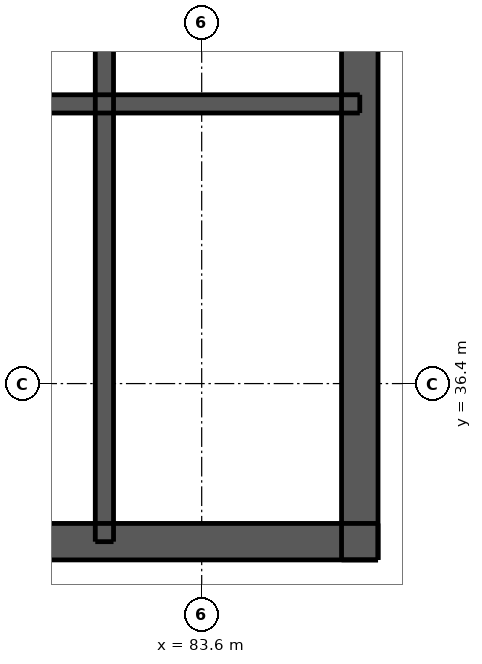
"""IFC4 building model, lengths in metres.
Left out: names, types, materials, properties, quantities, classifications, styles, units other than length and angle.
Written with IfcOpenShell. Run it as: python <this file> out.ifc"""

import sys

from ifc_helpers import new_model, si_unit, direction, frame, frame_2d, origin, place, context, subcontext, project, spatial, rectangle, extrude, element, fill, save


model = new_model("IFC4")
c1 = context("Model", 3, precision=1e-05, world=origin(), true_north=direction((0.0, 1.0)))
c2 = subcontext(c1, "Body", "Model", "MODEL_VIEW")
j1 = project(units=[si_unit("LENGTHUNIT", "METRE"), si_unit("PLANEANGLEUNIT", "RADIAN")], contexts=[c1])
p1 = place(None, origin())
s1 = spatial("IfcSite", under=j1, at=p1, CompositionType="ELEMENT")
p2 = place(p1, origin())
s2 = spatial("IfcBuilding", under=s1, at=p2, CompositionType="ELEMENT")
p3 = place(p2, frame((0.0, 0.0, 187.0)))
s3 = spatial("IfcBuildingStorey", under=s2, at=p3, CompositionType="ELEMENT", Elevation=187.0)
p4 = place(p3, frame((62.5, 33.8, 0.0), z_axis=(0.0, 0.0, 1.0), x_axis=(1.0, 0.0, 0.0)))
e1 = element("IfcWall", 1, at=p4, inside=s3, PredefinedType="SHEAR", context=c2, shape_type="SweptSolid", body=[
    extrude(rectangle(XDim=24.0, YDim=0.6, at=frame_2d((12.0, 0.0))), origin(), (0.0, 0.0, 1.0), 3.05),
])
p5 = place(p4, frame((1.925, 0.0, 0.0)))
e2 = element("IfcOpeningElement", 2, at=p5, cuts=e1, PredefinedType="OPENING", context=c2, shape_type="SweptSolid", body=[
    extrude(rectangle(XDim=1.1, YDim=2.1, at=frame_2d((0.55, 1.05))), frame((0.0, 0.31, 0.0), z_axis=(0.0, -1.0, 0.0), x_axis=(1.0, 0.0, 0.0)), (0.0, 0.0, 1.0), 0.62),
])
p6 = place(p4, frame((20.975, 0.0, 0.0)))
e3 = element("IfcOpeningElement", 3, at=p6, cuts=e1, PredefinedType="OPENING", context=c2, shape_type="SweptSolid", body=[
    extrude(rectangle(XDim=1.1, YDim=2.1, at=frame_2d((0.55, 1.05))), frame((0.0, 0.31, 0.0), z_axis=(0.0, -1.0, 0.0), x_axis=(1.0, 0.0, 0.0)), (0.0, 0.0, 1.0), 0.62),
])
p7 = place(p4, frame((8.0, 0.0, 0.0)))
e4 = element("IfcOpeningElement", 4, at=p7, cuts=e1, PredefinedType="OPENING", context=c2, shape_type="SweptSolid", body=[
    extrude(rectangle(XDim=1.1, YDim=2.1, at=frame_2d((0.55, 1.05))), frame((0.0, 0.31, 0.0), z_axis=(0.0, -1.0, 0.0), x_axis=(1.0, 0.0, 0.0)), (0.0, 0.0, 1.0), 0.62),
])
p8 = place(p4, frame((13.5, 0.0, 0.0)))
e5 = element("IfcOpeningElement", 5, at=p8, cuts=e1, PredefinedType="OPENING", context=c2, shape_type="SweptSolid", body=[
    extrude(rectangle(XDim=0.9, YDim=2.1, at=frame_2d((0.45, 1.05))), frame((0.0, 0.31, 0.0), z_axis=(0.0, -1.0, 0.0), x_axis=(1.0, 0.0, 0.0)), (0.0, 0.0, 1.0), 0.62),
])
p9 = place(p4, frame((17.1, 0.0, 0.0)))
e6 = element("IfcOpeningElement", 6, at=p9, cuts=e1, PredefinedType="OPENING", context=c2, shape_type="SweptSolid", body=[
    extrude(rectangle(XDim=0.9, YDim=2.1, at=frame_2d((0.45, 1.05))), frame((0.0, 0.31, 0.0), z_axis=(0.0, -1.0, 0.0), x_axis=(1.0, 0.0, 0.0)), (0.0, 0.0, 1.0), 0.62),
])
p10 = place(p3, frame((86.2, 33.5, 0.0), z_axis=(0.0, 0.0, 1.0), x_axis=(0.0, 1.0, 0.0)))
e7 = element("IfcWall", 7, at=p10, inside=s3, PredefinedType="SHEAR", context=c2, shape_type="SweptSolid", body=[
    extrude(rectangle(XDim=24.0, YDim=0.6, at=frame_2d((12.0, 0.0))), origin(), (0.0, 0.0, 1.0), 3.05),
])
p11 = place(p10, frame((11.2, 0.0, 0.0)))
e8 = element("IfcOpeningElement", 8, at=p11, cuts=e7, PredefinedType="OPENING", context=c2, shape_type="SweptSolid", body=[
    extrude(rectangle(XDim=1.6, YDim=2.1, at=frame_2d((0.8, 1.05))), frame((0.0, 0.31, 0.0), z_axis=(0.0, -1.0, 0.0), x_axis=(1.0, 0.0, 0.0)), (0.0, 0.0, 1.0), 0.62),
])
p12 = place(p3, frame((62.8, 41.0, 0.0), z_axis=(0.0, 0.0, 1.0), x_axis=(1.0, 0.0, 0.0)))
e9 = element("IfcWall", 9, at=p12, inside=s3, PredefinedType="SHEAR", context=c2, shape_type="SweptSolid", body=[
    extrude(rectangle(XDim=23.4, YDim=0.3, at=frame_2d((11.7, 0.0))), origin(), (0.0, 0.0, 1.0), 3.05),
])
p13 = place(p3, frame((82.0, 33.8, 0.0), z_axis=(0.0, 0.0, 1.0), x_axis=(0.0, 1.0, 0.0)))
e10 = element("IfcWall", 10, at=p13, inside=s3, PredefinedType="SHEAR", context=c2, shape_type="SweptSolid", body=[
    extrude(rectangle(XDim=10.1, YDim=0.3, at=frame_2d((5.05, 0.0))), origin(), (0.0, 0.0, 1.0), 3.05),
])
p14 = place(p6, origin())
e11 = element("IfcDoor", 11, at=p14, inside=s3, OperationType="SINGLE_SWING_RIGHT", PredefinedType="DOOR", context=c2, shape_type="SweptSolid", body=[
    extrude(rectangle(XDim=1.1, YDim=2.1, at=frame_2d((0.55, 1.05))), frame((0.0, 0.288, 0.0), z_axis=(0.0, -1.0, 0.0), x_axis=(1.0, 0.0, 0.0)), (0.0, 0.0, 1.0), 0.05),
])
fill(e3, e11)
save(model, sys.argv[1])
